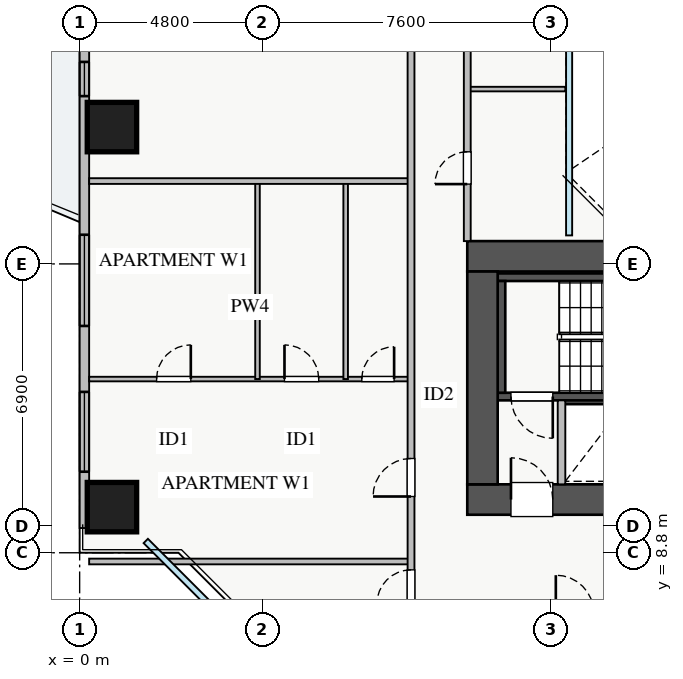
"""IFC4 building model, lengths in metres.
Left out: names, types, materials, properties, quantities, classifications, styles, units other than length and angle.
Written with IfcOpenShell. Run it as: python <this file> out.ifc"""

import sys

from ifc_helpers import new_model, si_unit, direction, frame, frame_2d, origin, origin_2d, place, context, subcontext, project, spatial, rectangle, extrude, source, transform, mapped, element, fill, save


model = new_model("IFC4")
c1 = context("Model", 3, precision=1e-05, world=origin(), true_north=direction((0.0, 1.0)))
c2 = subcontext(c1, "Body", "Model", "MODEL_VIEW")
j1 = project(units=[si_unit("LENGTHUNIT", "METRE"), si_unit("PLANEANGLEUNIT", "RADIAN")], contexts=[c1])
p1 = place(None, origin())
s1 = spatial("IfcSite", under=j1, at=p1, CompositionType="ELEMENT")
p2 = place(p1, origin())
s2 = spatial("IfcBuilding", under=s1, at=p2, CompositionType="ELEMENT")
p3 = place(p2, frame((0.0, 0.0, 86.0)))
s3 = spatial("IfcBuildingStorey", under=s2, at=p3, CompositionType="ELEMENT", Elevation=86.0)
p4 = place(p3, frame((12.68, 12.8, 0.0), z_axis=(0.0, 0.0, 1.0), x_axis=(1.0, 0.0, 0.0)))
e1 = element("IfcWall", 1, at=p4, inside=s3, PredefinedType="SHEAR", context=c2, shape_type="SweptSolid", body=[
    extrude(rectangle(XDim=1.94, YDim=0.18, at=frame_2d((0.97, 0.0))), origin(), (0.0, 0.0, 1.0), 3.07),
])
p5 = place(p3, frame((11.0, 12.91, 0.0), z_axis=(0.0, 0.0, 1.0), x_axis=(1.0, 0.0, 0.0)))
e2 = element("IfcWall", 2, at=p5, inside=s3, PredefinedType="SHEAR", context=c2, shape_type="SweptSolid", body=[
    extrude(rectangle(XDim=7.15, YDim=0.2, at=frame_2d((3.575, 0.0))), origin(), (0.0, 0.0, 1.0), 3.25),
])
p6 = place(p5, frame((0.35, 0.0, 0.0)))
e3 = element("IfcOpeningElement", 3, at=p6, cuts=e2, PredefinedType="OPENING", context=c2, shape_type="SweptSolid", body=[
    extrude(rectangle(XDim=1.1, YDim=2.05, at=frame_2d((0.55, 1.025))), frame((0.0, 0.11, 0.0), z_axis=(0.0, -1.0, 0.0), x_axis=(1.0, 0.0, 0.0)), (0.0, 0.0, 1.0), 0.22),
])
p7 = place(p3, frame((11.0, 16.05, 0.0), z_axis=(0.0, 0.0, 1.0), x_axis=(1.0, 0.0, 0.0)))
e4 = element("IfcWall", 4, at=p7, inside=s3, PredefinedType="SHEAR", context=c2, shape_type="SweptSolid", body=[
    extrude(rectangle(XDim=7.15, YDim=0.2, at=frame_2d((3.575, 0.0))), origin(), (0.0, 0.0, 1.0), 3.25),
])
p8 = place(p3, frame((11.1, 13.01, 0.0), z_axis=(0.0, 0.0, 1.0), x_axis=(0.0, 1.0, 0.0)))
e5 = element("IfcWall", 5, at=p8, inside=s3, PredefinedType="SHEAR", context=c2, shape_type="SweptSolid", body=[
    extrude(rectangle(XDim=2.94, YDim=0.2, at=frame_2d((1.47, 0.0))), origin(), (0.0, 0.0, 1.0), 3.25),
])
p9 = place(p3, frame((10.2, 10.2, 0.0), z_axis=(0.0, 0.0, 1.0), x_axis=(1.0, 0.0, 0.0)))
e6 = element("IfcWall", 6, at=p9, inside=s3, PredefinedType="SHEAR", context=c2, shape_type="SweptSolid", body=[
    extrude(rectangle(XDim=17.6, YDim=0.8, at=frame_2d((8.8, 0.0))), origin(), (0.0, 0.0, 1.0), 3.25),
])
p10 = place(p9, frame((1.15, 0.0, 0.0)))
e7 = element("IfcOpeningElement", 7, at=p10, cuts=e6, PredefinedType="OPENING", context=c2, shape_type="SweptSolid", body=[
    extrude(rectangle(XDim=1.1, YDim=2.05, at=frame_2d((0.55, 1.025))), frame((0.0, 0.41, 0.0), z_axis=(0.0, -1.0, 0.0), x_axis=(1.0, 0.0, 0.0)), (0.0, 0.0, 1.0), 0.82),
])
p11 = place(p9, frame((8.3, 0.0, 0.0)))
e8 = element("IfcOpeningElement", 8, at=p11, cuts=e6, PredefinedType="OPENING", context=c2, shape_type="SweptSolid", body=[
    extrude(rectangle(XDim=1.1, YDim=2.05, at=frame_2d((0.55, 1.025))), frame((0.0, 0.41, 0.0), z_axis=(0.0, -1.0, 0.0), x_axis=(1.0, 0.0, 0.0)), (0.0, 0.0, 1.0), 0.82),
])
p12 = place(p9, frame((10.05, 0.0, 0.0)))
e9 = element("IfcOpeningElement", 9, at=p12, cuts=e6, PredefinedType="OPENING", context=c2, shape_type="SweptSolid", body=[
    extrude(rectangle(XDim=1.1, YDim=2.05, at=frame_2d((0.55, 1.025))), frame((0.0, 0.41, 0.0), z_axis=(0.0, -1.0, 0.0), x_axis=(1.0, 0.0, 0.0)), (0.0, 0.0, 1.0), 0.82),
])
p13 = place(p9, frame((14.74, 0.0, 0.0)))
e10 = element("IfcOpeningElement", 10, at=p13, cuts=e6, PredefinedType="OPENING", context=c2, shape_type="SweptSolid", body=[
    extrude(rectangle(XDim=1.0, YDim=2.05, at=frame_2d((0.5, 1.025))), frame((0.0, 0.41, 0.0), z_axis=(0.0, -1.0, 0.0), x_axis=(1.0, 0.0, 0.0)), (0.0, 0.0, 1.0), 0.82),
])
p14 = place(p9, frame((11.945, 0.0, 0.0)))
e11 = element("IfcOpeningElement", 11, at=p14, cuts=e6, PredefinedType="OPENING", context=c2, shape_type="SweptSolid", body=[
    extrude(rectangle(XDim=1.0, YDim=2.05, at=frame_2d((0.5, 1.025))), frame((0.0, 0.41, 0.0), z_axis=(0.0, -1.0, 0.0), x_axis=(1.0, 0.0, 0.0)), (0.0, 0.0, 1.0), 0.82),
])
p15 = place(p9, frame((13.48, 0.0, 0.0)))
e12 = element("IfcOpeningElement", 12, at=p15, cuts=e6, PredefinedType="OPENING", context=c2, shape_type="SweptSolid", body=[
    extrude(rectangle(XDim=1.0, YDim=2.05, at=frame_2d((0.5, 1.025))), frame((0.0, 0.41, 0.0), z_axis=(0.0, -1.0, 0.0), x_axis=(1.0, 0.0, 0.0)), (0.0, 0.0, 1.0), 0.82),
])
p16 = place(p3, frame((10.2, 16.6, 0.0), z_axis=(0.0, 0.0, 1.0), x_axis=(1.0, 0.0, 0.0)))
e13 = element("IfcWall", 13, at=p16, inside=s3, PredefinedType="SHEAR", context=c2, shape_type="SweptSolid", body=[
    extrude(rectangle(XDim=17.6, YDim=0.8, at=frame_2d((8.8, 0.0))), origin(), (0.0, 0.0, 1.0), 3.25),
])
p17 = place(p3, frame((10.6, 10.6, 0.0), z_axis=(0.0, 0.0, 1.0), x_axis=(0.0, 1.0, 0.0)))
e14 = element("IfcWall", 14, at=p17, inside=s3, PredefinedType="SHEAR", context=c2, shape_type="SweptSolid", body=[
    extrude(rectangle(XDim=5.6, YDim=0.8, at=frame_2d((2.8, 0.0))), origin(), (0.0, 0.0, 1.0), 3.25),
])
m1 = source(origin(), c2, "Body", "SweptSolid", [
    extrude(rectangle(XDim=1.3, YDim=1.3, at=origin_2d()), origin(), (0.0, 0.0, 1.0), 3.25),
])
for number, where, z_axis, x_axis in (
    (15, (0.85, 20.0, 0.0), (0.0, 0.0, 1.0), (1.0, 0.0, 0.0)),
    (16, (0.85, 10.0, 0.0), (0.0, 0.0, 1.0), (1.0, 0.0, 0.0)),
):
    element("IfcColumn", number, at=place(p3, frame(where, z_axis=z_axis, x_axis=x_axis)), inside=s3, PredefinedType="COLUMN", context=c2, shape_type="MappedRepresentation", body=[
        mapped(m1, transform((0.0, 0.0, 0.0), x_axis=(1.0, 0.0, 0.0), y_axis=(0.0, 1.0, 0.0), z_axis=(0.0, 0.0, 1.0), scale=1.0)),
    ])
p18 = place(p3, frame((0.125, 9.45, 0.0), z_axis=(0.0, 0.0, 1.0), x_axis=(0.0, 1.0, 0.0)))
e17 = element("IfcWall", 17, at=p18, inside=s3, PredefinedType="STANDARD", context=c2, shape_type="SweptSolid", body=[
    extrude(rectangle(XDim=27.1, YDim=0.25, at=frame_2d((13.55, 0.0))), origin(), (0.0, 0.0, 1.0), 2.61),
])
p19 = place(p18, frame((14.4, 0.0, 0.0)))
e18 = element("IfcOpeningElement", 18, at=p19, cuts=e17, PredefinedType="OPENING", context=c2, shape_type="SweptSolid", body=[
    extrude(rectangle(XDim=1.2, YDim=2.1, at=frame_2d((0.6, 1.05))), frame((0.0, 0.135, 0.0), z_axis=(0.0, -1.0, 0.0), x_axis=(1.0, 0.0, 0.0)), (0.0, 0.0, 1.0), 0.27),
])
p20 = place(p18, frame((1.482, 0.0, 0.9)))
e19 = element("IfcOpeningElement", 19, at=p20, cuts=e17, PredefinedType="OPENING", context=c2, shape_type="SweptSolid", body=[
    extrude(rectangle(XDim=2.1, YDim=1.5, at=frame_2d((1.05, 0.75))), frame((0.0, 0.135, 0.0), z_axis=(0.0, -1.0, 0.0), x_axis=(1.0, 0.0, 0.0)), (0.0, 0.0, 1.0), 0.27),
])
p21 = place(p18, frame((23.272, 0.0, 0.9)))
e20 = element("IfcOpeningElement", 20, at=p21, cuts=e17, PredefinedType="OPENING", context=c2, shape_type="SweptSolid", body=[
    extrude(rectangle(XDim=2.1, YDim=1.5, at=frame_2d((1.05, 0.75))), frame((0.0, 0.135, 0.0), z_axis=(0.0, -1.0, 0.0), x_axis=(1.0, 0.0, 0.0)), (0.0, 0.0, 1.0), 0.27),
])
p22 = place(p18, frame((5.317, 0.0, 0.9)))
e21 = element("IfcOpeningElement", 21, at=p22, cuts=e17, PredefinedType="OPENING", context=c2, shape_type="SweptSolid", body=[
    extrude(rectangle(XDim=2.4, YDim=1.5, at=frame_2d((1.2, 0.75))), frame((0.0, 0.135, 0.0), z_axis=(0.0, -1.0, 0.0), x_axis=(1.0, 0.0, 0.0)), (0.0, 0.0, 1.0), 0.27),
])
p23 = place(p18, frame((11.365, 0.0, 0.9)))
e22 = element("IfcOpeningElement", 22, at=p23, cuts=e17, PredefinedType="OPENING", context=c2, shape_type="SweptSolid", body=[
    extrude(rectangle(XDim=0.9, YDim=1.2, at=frame_2d((0.45, 0.6))), frame((0.0, 0.135, 0.0), z_axis=(0.0, -1.0, 0.0), x_axis=(1.0, 0.0, 0.0)), (0.0, 0.0, 1.0), 0.27),
])
p24 = place(p18, frame((18.365, 0.0, 0.9)))
e23 = element("IfcOpeningElement", 23, at=p24, cuts=e17, PredefinedType="OPENING", context=c2, shape_type="SweptSolid", body=[
    extrude(rectangle(XDim=0.9, YDim=1.2, at=frame_2d((0.45, 0.6))), frame((0.0, 0.135, 0.0), z_axis=(0.0, -1.0, 0.0), x_axis=(1.0, 0.0, 0.0)), (0.0, 0.0, 1.0), 0.27),
])
p25 = place(p3, frame((12.68, 10.6, 0.0), z_axis=(0.0, 0.0, 1.0), x_axis=(0.0, 1.0, 0.0)))
e24 = element("IfcWall", 24, at=p25, inside=s3, PredefinedType="PARTITIONING", context=c2, shape_type="SweptSolid", body=[
    extrude(rectangle(XDim=2.21, YDim=0.2, at=frame_2d((1.105, 0.0))), origin(), (0.0, 0.0, 1.0), 3.07),
])
p26 = place(p3, frame((0.25, 8.57, 0.0), z_axis=(0.0, 0.0, 1.0), x_axis=(1.0, 0.0, 0.0)))
e25 = element("IfcWall", 25, at=p26, inside=s3, PredefinedType="PARTITIONING", context=c2, shape_type="SweptSolid", body=[
    extrude(rectangle(XDim=8.47, YDim=0.15, at=frame_2d((4.235, 0.0))), origin(), (0.0, 0.0, 1.0), 3.07),
])
p27 = place(p3, frame((0.25, 13.37, 0.0), z_axis=(0.0, 0.0, 1.0), x_axis=(1.0, 0.0, 0.0)))
e26 = element("IfcWall", 26, at=p27, inside=s3, PredefinedType="PLUMBINGWALL", context=c2, shape_type="SweptSolid", body=[
    extrude(rectangle(XDim=8.47, YDim=0.12, at=frame_2d((4.235, 0.0))), origin(), (0.0, 0.0, 1.0), 3.07),
])
p28 = place(p27, frame((1.775, 0.0, 0.0)))
e27 = element("IfcOpeningElement", 27, at=p28, cuts=e26, PredefinedType="OPENING", context=c2, shape_type="SweptSolid", body=[
    extrude(rectangle(XDim=0.9, YDim=2.05, at=frame_2d((0.45, 1.025))), frame((0.0, 0.07, 0.0), z_axis=(0.0, -1.0, 0.0), x_axis=(1.0, 0.0, 0.0)), (0.0, 0.0, 1.0), 0.14),
])
p29 = place(p27, frame((5.14, 0.0, 0.0)))
e28 = element("IfcOpeningElement", 28, at=p29, cuts=e26, PredefinedType="OPENING", context=c2, shape_type="SweptSolid", body=[
    extrude(rectangle(XDim=0.9, YDim=2.05, at=frame_2d((0.45, 1.025))), frame((0.0, 0.07, 0.0), z_axis=(0.0, -1.0, 0.0), x_axis=(1.0, 0.0, 0.0)), (0.0, 0.0, 1.0), 0.14),
])
p30 = place(p27, frame((7.175, 0.0, 0.0)))
e29 = element("IfcOpeningElement", 29, at=p30, cuts=e26, PredefinedType="OPENING", context=c2, shape_type="SweptSolid", body=[
    extrude(rectangle(XDim=0.85, YDim=2.05, at=frame_2d((0.425, 1.025))), frame((0.0, 0.07, 0.0), z_axis=(0.0, -1.0, 0.0), x_axis=(1.0, 0.0, 0.0)), (0.0, 0.0, 1.0), 0.14),
])
for number, where, z_axis, x_axis in (
    (30, (4.68, 13.37, 0.0), (0.0, 0.0, 1.0), (0.0, 1.0, 0.0)),
    (31, (7.0, 13.37, 0.0), (0.0, 0.0, 1.0), (0.0, 1.0, 0.0)),
):
    element("IfcWall", number, at=place(p3, frame(where, z_axis=z_axis, x_axis=x_axis)), inside=s3, PredefinedType="PLUMBINGWALL", context=c2, shape_type="SweptSolid", body=[
        extrude(rectangle(XDim=5.21, YDim=0.12, at=frame_2d((2.605, 0.0))), origin(), (0.0, 0.0, 1.0), 3.07),
    ])
p31 = place(p3, frame((0.25, 18.58, 0.0), z_axis=(0.0, 0.0, 1.0), x_axis=(1.0, 0.0, 0.0)))
e32 = element("IfcWall", 32, at=p31, inside=s3, PredefinedType="PARTITIONING", context=c2, shape_type="SweptSolid", body=[
    extrude(rectangle(XDim=8.47, YDim=0.15, at=frame_2d((4.235, 0.0))), origin(), (0.0, 0.0, 1.0), 3.07),
])
p32 = place(p3, frame((8.72, 7.21, 0.0), z_axis=(0.0, 0.0, 1.0), x_axis=(0.0, 1.0, 0.0)))
e33 = element("IfcWall", 33, at=p32, inside=s3, PredefinedType="PARTITIONING", context=c2, shape_type="SweptSolid", body=[
    extrude(rectangle(XDim=31.23, YDim=0.18, at=frame_2d((15.615, 0.0))), origin(), (0.0, 0.0, 1.0), 3.07),
])
p33 = place(p32, frame((30.09, 0.0, 0.0)))
e34 = element("IfcOpeningElement", 34, at=p33, cuts=e33, PredefinedType="OPENING", context=c2, shape_type="SweptSolid", body=[
    extrude(rectangle(XDim=0.9, YDim=2.05, at=frame_2d((0.45, 1.025))), frame((0.0, 0.1, 0.0), z_axis=(0.0, -1.0, 0.0), x_axis=(1.0, 0.0, 0.0)), (0.0, 0.0, 1.0), 0.2),
])
p34 = place(p32, frame((0.24, 0.0, 0.0)))
e35 = element("IfcOpeningElement", 35, at=p34, cuts=e33, PredefinedType="OPENING", context=c2, shape_type="SweptSolid", body=[
    extrude(rectangle(XDim=0.9, YDim=2.05, at=frame_2d((0.45, 1.025))), frame((0.0, 0.1, 0.0), z_axis=(0.0, -1.0, 0.0), x_axis=(1.0, 0.0, 0.0)), (0.0, 0.0, 1.0), 0.2),
])
p35 = place(p32, frame((3.07, 0.0, 0.0)))
e36 = element("IfcOpeningElement", 36, at=p35, cuts=e33, PredefinedType="OPENING", context=c2, shape_type="SweptSolid", body=[
    extrude(rectangle(XDim=1.0, YDim=2.05, at=frame_2d((0.5, 1.025))), frame((0.0, 0.1, 0.0), z_axis=(0.0, -1.0, 0.0), x_axis=(1.0, 0.0, 0.0)), (0.0, 0.0, 1.0), 0.2),
])
p36 = place(p32, frame((15.37, 0.0, 0.0)))
e37 = element("IfcOpeningElement", 37, at=p36, cuts=e33, PredefinedType="OPENING", context=c2, shape_type="SweptSolid", body=[
    extrude(rectangle(XDim=1.0, YDim=2.05, at=frame_2d((0.5, 1.025))), frame((0.0, 0.1, 0.0), z_axis=(0.0, -1.0, 0.0), x_axis=(1.0, 0.0, 0.0)), (0.0, 0.0, 1.0), 0.2),
])
p37 = place(p32, frame((21.96, 0.0, 0.0)))
e38 = element("IfcOpeningElement", 38, at=p37, cuts=e33, PredefinedType="OPENING", context=c2, shape_type="SweptSolid", body=[
    extrude(rectangle(XDim=1.0, YDim=2.05, at=frame_2d((0.5, 1.025))), frame((0.0, 0.1, 0.0), z_axis=(0.0, -1.0, 0.0), x_axis=(1.0, 0.0, 0.0)), (0.0, 0.0, 1.0), 0.2),
])
p38 = place(p3, frame((10.2, 21.0, 0.0), z_axis=(0.0, 0.0, 1.0), x_axis=(1.0, 0.0, 0.0)))
e39 = element("IfcWall", 39, at=p38, inside=s3, PredefinedType="PLUMBINGWALL", context=c2, shape_type="SweptSolid", body=[
    extrude(rectangle(XDim=2.58, YDim=0.12, at=frame_2d((1.29, 0.0))), origin(), (0.0, 0.0, 1.0), 3.07),
])
p39 = place(p3, frame((10.2, 17.0, 0.0), z_axis=(0.0, 0.0, 1.0), x_axis=(0.0, 1.0, 0.0)))
e40 = element("IfcWall", 40, at=p39, inside=s3, PredefinedType="PARTITIONING", context=c2, shape_type="SweptSolid", body=[
    extrude(rectangle(XDim=12.0, YDim=0.18, at=frame_2d((6.0, 0.0))), origin(), (0.0, 0.0, 1.0), 3.07),
])
p40 = place(p39, frame((1.5, 0.0, 0.0)))
e41 = element("IfcOpeningElement", 41, at=p40, cuts=e40, PredefinedType="OPENING", context=c2, shape_type="SweptSolid", body=[
    extrude(rectangle(XDim=0.85, YDim=2.05, at=frame_2d((0.425, 1.025))), frame((0.0, 0.1, 0.0), z_axis=(0.0, -1.0, 0.0), x_axis=(1.0, 0.0, 0.0)), (0.0, 0.0, 1.0), 0.2),
])
p41 = place(p39, frame((6.5, 0.0, 0.0)))
e42 = element("IfcOpeningElement", 42, at=p41, cuts=e40, PredefinedType="OPENING", context=c2, shape_type="SweptSolid", body=[
    extrude(rectangle(XDim=1.0, YDim=2.05, at=frame_2d((0.5, 1.025))), frame((0.0, 0.1, 0.0), z_axis=(0.0, -1.0, 0.0), x_axis=(1.0, 0.0, 0.0)), (0.0, 0.0, 1.0), 0.2),
])
m2 = source(origin(), c2, "Body", "SweptSolid", [
    extrude(rectangle(XDim=2.1, YDim=1.5, at=frame_2d((1.05, 0.75))), frame((0.0, 0.03, 0.0), z_axis=(0.0, -1.0, 0.0), x_axis=(1.0, 0.0, 0.0)), (0.0, 0.0, 1.0), 0.06),
])
p42 = place(p20, origin())
e43 = element("IfcWindow", 43, at=p42, inside=s3, PartitioningType="TRIPLE_PANEL_VERTICAL", PredefinedType="WINDOW", context=c2, shape_type="MappedRepresentation", body=[
    mapped(m2, transform((0.0, 0.0, 0.0), x_axis=(1.0, 0.0, 0.0), y_axis=(0.0, 1.0, 0.0), z_axis=(0.0, 0.0, 1.0), scale=1.0)),
])
fill(e19, e43)
m3 = source(origin(), c2, "Body", "SweptSolid", [
    extrude(rectangle(XDim=1.1, YDim=2.05, at=frame_2d((0.55, 1.025))), frame((0.0, 0.025, 0.0), z_axis=(0.0, -1.0, 0.0), x_axis=(1.0, 0.0, 0.0)), (0.0, 0.0, 1.0), 0.05),
])
p43 = place(p10, origin())
e44 = element("IfcDoor", 44, at=p43, inside=s3, OperationType="SINGLE_SWING_LEFT", PredefinedType="DOOR", context=c2, shape_type="MappedRepresentation", body=[
    mapped(m3, transform((0.0, 0.0, 0.0), x_axis=(1.0, 0.0, 0.0), y_axis=(0.0, 1.0, 0.0), z_axis=(0.0, 0.0, 1.0), scale=1.0)),
])
fill(e7, e44)
p44 = place(p6, frame((1.1, 0.0, 0.0), z_axis=(0.0, 0.0, 1.0), x_axis=(-1.0, 0.0, 0.0)))
e45 = element("IfcDoor", 45, at=p44, inside=s3, OperationType="SINGLE_SWING_RIGHT", PredefinedType="DOOR", context=c2, shape_type="MappedRepresentation", body=[
    mapped(m3, transform((0.0, 0.0, 0.0), x_axis=(1.0, 0.0, 0.0), y_axis=(0.0, 1.0, 0.0), z_axis=(0.0, 0.0, 1.0), scale=1.0)),
])
fill(e3, e45)
m4 = source(origin(), c2, "Body", "SweptSolid", [
    extrude(rectangle(XDim=0.9, YDim=2.05, at=frame_2d((0.45, 1.025))), frame((0.0, 0.025, 0.0), z_axis=(0.0, -1.0, 0.0), x_axis=(1.0, 0.0, 0.0)), (0.0, 0.0, 1.0), 0.05),
])
p45 = place(p28, origin())
e46 = element("IfcDoor", 46, at=p45, inside=s3, OperationType="SINGLE_SWING_RIGHT", PredefinedType="DOOR", context=c2, shape_type="MappedRepresentation", body=[
    mapped(m4, transform((0.0, 0.0, 0.0), x_axis=(1.0, 0.0, 0.0), y_axis=(0.0, 1.0, 0.0), z_axis=(0.0, 0.0, 1.0), scale=1.0)),
])
fill(e27, e46)
p46 = place(p29, origin())
e47 = element("IfcDoor", 47, at=p46, inside=s3, OperationType="SINGLE_SWING_LEFT", PredefinedType="DOOR", context=c2, shape_type="MappedRepresentation", body=[
    mapped(m4, transform((0.0, 0.0, 0.0), x_axis=(1.0, 0.0, 0.0), y_axis=(0.0, 1.0, 0.0), z_axis=(0.0, 0.0, 1.0), scale=1.0)),
])
fill(e28, e47)
m5 = source(origin(), c2, "Body", "SweptSolid", [
    extrude(rectangle(XDim=0.85, YDim=2.05, at=frame_2d((0.425, 1.025))), frame((0.0, 0.025, 0.0), z_axis=(0.0, -1.0, 0.0), x_axis=(1.0, 0.0, 0.0)), (0.0, 0.0, 1.0), 0.05),
])
p47 = place(p30, origin())
e48 = element("IfcDoor", 48, at=p47, inside=s3, OperationType="SINGLE_SWING_RIGHT", PredefinedType="DOOR", context=c2, shape_type="MappedRepresentation", body=[
    mapped(m5, transform((0.0, 0.0, 0.0), x_axis=(1.0, 0.0, 0.0), y_axis=(0.0, 1.0, 0.0), z_axis=(0.0, 0.0, 1.0), scale=1.0)),
])
fill(e29, e48)
p48 = place(p34, origin())
e49 = element("IfcDoor", 49, at=p48, inside=s3, OperationType="SINGLE_SWING_LEFT", PredefinedType="DOOR", context=c2, shape_type="MappedRepresentation", body=[
    mapped(m4, transform((0.0, 0.0, 0.0), x_axis=(1.0, 0.0, 0.0), y_axis=(0.0, 1.0, 0.0), z_axis=(0.0, 0.0, 1.0), scale=1.0)),
])
fill(e35, e49)
m6 = source(origin(), c2, "Body", "SweptSolid", [
    extrude(rectangle(XDim=1.0, YDim=2.05, at=frame_2d((0.5, 1.025))), frame((0.0, 0.025, 0.0), z_axis=(0.0, -1.0, 0.0), x_axis=(1.0, 0.0, 0.0)), (0.0, 0.0, 1.0), 0.05),
])
p49 = place(p35, origin())
e50 = element("IfcDoor", 50, at=p49, inside=s3, OperationType="SINGLE_SWING_LEFT", PredefinedType="DOOR", context=c2, shape_type="MappedRepresentation", body=[
    mapped(m6, transform((0.0, 0.0, 0.0), x_axis=(1.0, 0.0, 0.0), y_axis=(0.0, 1.0, 0.0), z_axis=(0.0, 0.0, 1.0), scale=1.0)),
])
fill(e36, e50)
p50 = place(p40, origin())
e51 = element("IfcDoor", 51, at=p50, inside=s3, OperationType="SINGLE_SWING_LEFT", PredefinedType="DOOR", context=c2, shape_type="MappedRepresentation", body=[
    mapped(m5, transform((0.0, 0.0, 0.0), x_axis=(1.0, 0.0, 0.0), y_axis=(0.0, 1.0, 0.0), z_axis=(0.0, 0.0, 1.0), scale=1.0)),
])
fill(e41, e51)
m7 = source(origin(), c2, "Body", "SweptSolid", [
    extrude(rectangle(XDim=2.4, YDim=1.5, at=frame_2d((1.2, 0.75))), frame((0.0, 0.03, 0.0), z_axis=(0.0, -1.0, 0.0), x_axis=(1.0, 0.0, 0.0)), (0.0, 0.0, 1.0), 0.06),
])
p51 = place(p22, origin())
e52 = element("IfcWindow", 52, at=p51, inside=s3, PartitioningType="TRIPLE_PANEL_VERTICAL", PredefinedType="WINDOW", context=c2, shape_type="MappedRepresentation", body=[
    mapped(m7, transform((0.0, 0.0, 0.0), x_axis=(1.0, 0.0, 0.0), y_axis=(0.0, 1.0, 0.0), z_axis=(0.0, 0.0, 1.0), scale=1.0)),
])
fill(e21, e52)
m8 = source(origin(), c2, "Body", "SweptSolid", [
    extrude(rectangle(XDim=0.9, YDim=1.2, at=frame_2d((0.45, 0.6))), frame((0.0, 0.03, 0.0), z_axis=(0.0, -1.0, 0.0), x_axis=(1.0, 0.0, 0.0)), (0.0, 0.0, 1.0), 0.06),
])
p52 = place(p23, origin())
e53 = element("IfcWindow", 53, at=p52, inside=s3, PartitioningType="SINGLE_PANEL", PredefinedType="WINDOW", context=c2, shape_type="MappedRepresentation", body=[
    mapped(m8, transform((0.0, 0.0, 0.0), x_axis=(1.0, 0.0, 0.0), y_axis=(0.0, 1.0, 0.0), z_axis=(0.0, 0.0, 1.0), scale=1.0)),
])
fill(e22, e53)
save(model, sys.argv[1])
